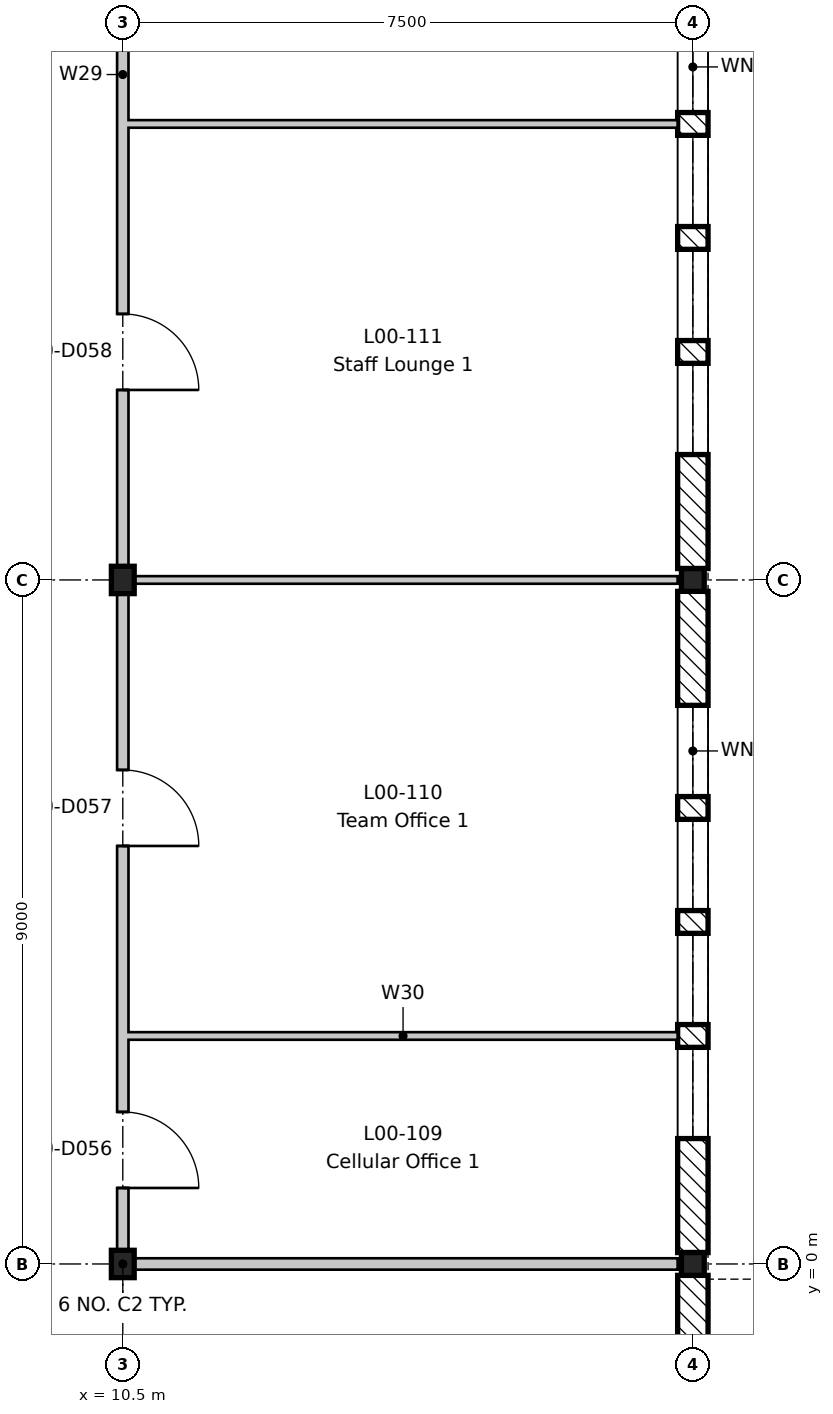
"""IFC4 building model, lengths in metres.
Left out: names, types, materials, properties, quantities, classifications, styles, units other than length and angle.
Written with IfcOpenShell. Run it as: python <this file> out.ifc"""

import sys

from ifc_helpers import new_model, si_unit, direction, frame, frame_2d, origin, origin_2d, place, context, subcontext, project, spatial, rectangle, i_section, extrude, element, fill, save


model = new_model("IFC4")
c1 = context("Model", 3, precision=1e-05, world=origin(), true_north=direction((0.0, 1.0)))
c2 = subcontext(c1, "Body", "Model", "MODEL_VIEW")
j1 = project(units=[si_unit("LENGTHUNIT", "METRE"), si_unit("PLANEANGLEUNIT", "RADIAN")], contexts=[c1])
p1 = place(None, origin())
s1 = spatial("IfcSite", under=j1, at=p1, CompositionType="ELEMENT")
p2 = place(p1, origin())
s2 = spatial("IfcBuilding", under=s1, at=p2, CompositionType="ELEMENT")
p3 = place(p2, origin())
s3 = spatial("IfcBuildingStorey", under=s2, at=p3, CompositionType="ELEMENT", Elevation=0.0)
for number, where, z_axis, x_axis in (
    (1, (10.5, 0.0, -0.6), (0.0, 0.0, 1.0), (1.0, 0.0, 0.0)),
    (2, (10.5, 9.0, -0.6), (0.0, 0.0, 1.0), (1.0, 0.0, 0.0)),
):
    element("IfcColumn", number, at=place(p3, frame(where, z_axis=z_axis, x_axis=x_axis)), inside=s3, PredefinedType="COLUMN", context=c2, shape_type="SweptSolid", body=[
        extrude(i_section(OverallWidth=0.3, OverallDepth=0.36, WebThickness=0.012, FlangeThickness=0.022, FilletRadius=0.027, at=origin_2d()), origin(), (0.0, 0.0, 1.0), 5.8),
    ])
for number, where, z_axis, x_axis in (
    (3, (18.0, 0.0, -0.6), (0.0, 0.0, 1.0), (1.0, 0.0, 0.0)),
    (4, (18.0, 9.0, -0.6), (0.0, 0.0, 1.0), (1.0, 0.0, 0.0)),
):
    element("IfcColumn", number, at=place(p3, frame(where, z_axis=z_axis, x_axis=x_axis)), inside=s3, PredefinedType="COLUMN", context=c2, shape_type="SweptSolid", body=[
        extrude(i_section(OverallWidth=0.3, OverallDepth=0.3, WebThickness=0.011, FlangeThickness=0.019, FilletRadius=0.027, at=origin_2d()), origin(), (0.0, 0.0, 1.0), 5.8),
    ])
p4 = place(p3, frame((18.0, -0.15, 0.0), z_axis=(0.0, 0.0, 1.0), x_axis=(0.0, -1.0, 0.0)))
e5 = element("IfcWall", 5, at=p4, inside=s3, PredefinedType="STANDARD", context=c2, shape_type="SweptSolid", body=[
    extrude(rectangle(XDim=8.7, YDim=0.4, at=frame_2d((4.35, 0.0))), origin(), (0.0, 0.0, 1.0), 4.8),
])
p5 = place(p4, frame((6.0, 0.0, 0.6)))
e6 = element("IfcOpeningElement", 6, at=p5, cuts=e5, PredefinedType="OPENING", context=c2, shape_type="SweptSolid", body=[
    extrude(rectangle(XDim=1.2, YDim=3.9, at=frame_2d((0.6, 1.95))), frame((0.0, 0.21, 0.0), z_axis=(0.0, -1.0, 0.0), x_axis=(1.0, 0.0, 0.0)), (0.0, 0.0, 1.0), 0.42),
])
p6 = place(p4, frame((4.5, 0.0, 0.6)))
e7 = element("IfcOpeningElement", 7, at=p6, cuts=e5, PredefinedType="OPENING", context=c2, shape_type="SweptSolid", body=[
    extrude(rectangle(XDim=1.2, YDim=3.9, at=frame_2d((0.6, 1.95))), frame((0.0, 0.21, 0.0), z_axis=(0.0, -1.0, 0.0), x_axis=(1.0, 0.0, 0.0)), (0.0, 0.0, 1.0), 0.42),
])
p7 = place(p4, frame((3.0, 0.0, 0.6)))
e8 = element("IfcOpeningElement", 8, at=p7, cuts=e5, PredefinedType="OPENING", context=c2, shape_type="SweptSolid", body=[
    extrude(rectangle(XDim=1.2, YDim=3.9, at=frame_2d((0.6, 1.95))), frame((0.0, 0.21, 0.0), z_axis=(0.0, -1.0, 0.0), x_axis=(1.0, 0.0, 0.0)), (0.0, 0.0, 1.0), 0.42),
])
p8 = place(p4, frame((1.5, 0.0, 0.6)))
e9 = element("IfcOpeningElement", 9, at=p8, cuts=e5, PredefinedType="OPENING", context=c2, shape_type="SweptSolid", body=[
    extrude(rectangle(XDim=1.2, YDim=3.9, at=frame_2d((0.6, 1.95))), frame((0.0, 0.21, 0.0), z_axis=(0.0, -1.0, 0.0), x_axis=(1.0, 0.0, 0.0)), (0.0, 0.0, 1.0), 0.42),
])
p9 = place(p3, frame((18.0, 8.85, 0.0), z_axis=(0.0, 0.0, 1.0), x_axis=(0.0, -1.0, 0.0)))
e10 = element("IfcWall", 10, at=p9, inside=s3, PredefinedType="STANDARD", context=c2, shape_type="SweptSolid", body=[
    extrude(rectangle(XDim=8.7, YDim=0.4, at=frame_2d((4.35, 0.0))), origin(), (0.0, 0.0, 1.0), 4.8),
])
p10 = place(p9, frame((6.0, 0.0, 0.6)))
e11 = element("IfcOpeningElement", 11, at=p10, cuts=e10, PredefinedType="OPENING", context=c2, shape_type="SweptSolid", body=[
    extrude(rectangle(XDim=1.2, YDim=3.9, at=frame_2d((0.6, 1.95))), frame((0.0, 0.21, 0.0), z_axis=(0.0, -1.0, 0.0), x_axis=(1.0, 0.0, 0.0)), (0.0, 0.0, 1.0), 0.42),
])
p11 = place(p9, frame((4.5, 0.0, 0.6)))
e12 = element("IfcOpeningElement", 12, at=p11, cuts=e10, PredefinedType="OPENING", context=c2, shape_type="SweptSolid", body=[
    extrude(rectangle(XDim=1.2, YDim=3.9, at=frame_2d((0.6, 1.95))), frame((0.0, 0.21, 0.0), z_axis=(0.0, -1.0, 0.0), x_axis=(1.0, 0.0, 0.0)), (0.0, 0.0, 1.0), 0.42),
])
p12 = place(p9, frame((3.0, 0.0, 0.6)))
e13 = element("IfcOpeningElement", 13, at=p12, cuts=e10, PredefinedType="OPENING", context=c2, shape_type="SweptSolid", body=[
    extrude(rectangle(XDim=1.2, YDim=3.9, at=frame_2d((0.6, 1.95))), frame((0.0, 0.21, 0.0), z_axis=(0.0, -1.0, 0.0), x_axis=(1.0, 0.0, 0.0)), (0.0, 0.0, 1.0), 0.42),
])
p13 = place(p9, frame((1.5, 0.0, 0.6)))
e14 = element("IfcOpeningElement", 14, at=p13, cuts=e10, PredefinedType="OPENING", context=c2, shape_type="SweptSolid", body=[
    extrude(rectangle(XDim=1.2, YDim=3.9, at=frame_2d((0.6, 1.95))), frame((0.0, 0.21, 0.0), z_axis=(0.0, -1.0, 0.0), x_axis=(1.0, 0.0, 0.0)), (0.0, 0.0, 1.0), 0.42),
])
p14 = place(p3, frame((18.0, 17.85, 0.0), z_axis=(0.0, 0.0, 1.0), x_axis=(0.0, -1.0, 0.0)))
e15 = element("IfcWall", 15, at=p14, inside=s3, PredefinedType="STANDARD", context=c2, shape_type="SweptSolid", body=[
    extrude(rectangle(XDim=8.7, YDim=0.4, at=frame_2d((4.35, 0.0))), origin(), (0.0, 0.0, 1.0), 4.8),
])
p15 = place(p14, frame((6.0, 0.0, 0.6)))
e16 = element("IfcOpeningElement", 16, at=p15, cuts=e15, PredefinedType="OPENING", context=c2, shape_type="SweptSolid", body=[
    extrude(rectangle(XDim=1.2, YDim=3.9, at=frame_2d((0.6, 1.95))), frame((0.0, 0.21, 0.0), z_axis=(0.0, -1.0, 0.0), x_axis=(1.0, 0.0, 0.0)), (0.0, 0.0, 1.0), 0.42),
])
p16 = place(p14, frame((4.5, 0.0, 0.6)))
e17 = element("IfcOpeningElement", 17, at=p16, cuts=e15, PredefinedType="OPENING", context=c2, shape_type="SweptSolid", body=[
    extrude(rectangle(XDim=1.2, YDim=3.9, at=frame_2d((0.6, 1.95))), frame((0.0, 0.21, 0.0), z_axis=(0.0, -1.0, 0.0), x_axis=(1.0, 0.0, 0.0)), (0.0, 0.0, 1.0), 0.42),
])
p17 = place(p14, frame((3.0, 0.0, 0.6)))
e18 = element("IfcOpeningElement", 18, at=p17, cuts=e15, PredefinedType="OPENING", context=c2, shape_type="SweptSolid", body=[
    extrude(rectangle(XDim=1.2, YDim=3.9, at=frame_2d((0.6, 1.95))), frame((0.0, 0.21, 0.0), z_axis=(0.0, -1.0, 0.0), x_axis=(1.0, 0.0, 0.0)), (0.0, 0.0, 1.0), 0.42),
])
p18 = place(p14, frame((1.5, 0.0, 0.6)))
e19 = element("IfcOpeningElement", 19, at=p18, cuts=e15, PredefinedType="OPENING", context=c2, shape_type="SweptSolid", body=[
    extrude(rectangle(XDim=1.2, YDim=3.9, at=frame_2d((0.6, 1.95))), frame((0.0, 0.21, 0.0), z_axis=(0.0, -1.0, 0.0), x_axis=(1.0, 0.0, 0.0)), (0.0, 0.0, 1.0), 0.42),
])
p19 = place(p3, frame((10.575, 0.0, 0.0), z_axis=(0.0, 0.0, 1.0), x_axis=(1.0, 0.0, 0.0)))
e20 = element("IfcWall", 20, at=p19, inside=s3, PredefinedType="PARTITIONING", context=c2, shape_type="SweptSolid", body=[
    extrude(rectangle(XDim=7.225, YDim=0.15, at=frame_2d((3.613, 0.0))), origin(), (0.0, 0.0, 1.0), 4.85),
])
p20 = place(p3, frame((10.575, 3.0, 0.0), z_axis=(0.0, 0.0, 1.0), x_axis=(1.0, 0.0, 0.0)))
e21 = element("IfcWall", 21, at=p20, inside=s3, PredefinedType="PARTITIONING", context=c2, shape_type="SweptSolid", body=[
    extrude(rectangle(XDim=7.225, YDim=0.1, at=frame_2d((3.613, 0.0))), origin(), (0.0, 0.0, 1.0), 5.2),
])
p21 = place(p3, frame((10.575, 9.0, 0.0), z_axis=(0.0, 0.0, 1.0), x_axis=(1.0, 0.0, 0.0)))
e22 = element("IfcWall", 22, at=p21, inside=s3, PredefinedType="PARTITIONING", context=c2, shape_type="SweptSolid", body=[
    extrude(rectangle(XDim=7.225, YDim=0.1, at=frame_2d((3.613, 0.0))), origin(), (0.0, 0.0, 1.0), 4.85),
])
p22 = place(p3, frame((10.575, 15.0, 0.0), z_axis=(0.0, 0.0, 1.0), x_axis=(1.0, 0.0, 0.0)))
e23 = element("IfcWall", 23, at=p22, inside=s3, PredefinedType="PARTITIONING", context=c2, shape_type="SweptSolid", body=[
    extrude(rectangle(XDim=7.225, YDim=0.1, at=frame_2d((3.613, 0.0))), origin(), (0.0, 0.0, 1.0), 5.2),
])
p23 = place(p3, frame((10.5, 0.0, 0.0), z_axis=(0.0, 0.0, 1.0), x_axis=(0.0, 1.0, 0.0)))
e24 = element("IfcWall", 24, at=p23, inside=s3, PredefinedType="PARTITIONING", context=c2, shape_type="SweptSolid", body=[
    extrude(rectangle(XDim=70.5, YDim=0.15, at=frame_2d((35.25, 0.0))), origin(), (0.0, 0.0, 1.0), 4.68),
])
p24 = place(p23, frame((1.0, 0.0, 0.0)))
e25 = element("IfcOpeningElement", 25, at=p24, cuts=e24, PredefinedType="OPENING", context=c2, shape_type="SweptSolid", body=[
    extrude(rectangle(XDim=1.0, YDim=2.1, at=frame_2d((0.5, 1.05))), frame((0.0, 0.085, 0.0), z_axis=(0.0, -1.0, 0.0), x_axis=(1.0, 0.0, 0.0)), (0.0, 0.0, 1.0), 0.17),
])
p25 = place(p23, frame((5.5, 0.0, 0.0)))
e26 = element("IfcOpeningElement", 26, at=p25, cuts=e24, PredefinedType="OPENING", context=c2, shape_type="SweptSolid", body=[
    extrude(rectangle(XDim=1.0, YDim=2.1, at=frame_2d((0.5, 1.05))), frame((0.0, 0.085, 0.0), z_axis=(0.0, -1.0, 0.0), x_axis=(1.0, 0.0, 0.0)), (0.0, 0.0, 1.0), 0.17),
])
p26 = place(p23, frame((11.5, 0.0, 0.0)))
e27 = element("IfcOpeningElement", 27, at=p26, cuts=e24, PredefinedType="OPENING", context=c2, shape_type="SweptSolid", body=[
    extrude(rectangle(XDim=1.0, YDim=2.1, at=frame_2d((0.5, 1.05))), frame((0.0, 0.085, 0.0), z_axis=(0.0, -1.0, 0.0), x_axis=(1.0, 0.0, 0.0)), (0.0, 0.0, 1.0), 0.17),
])
p27 = place(p23, frame((18.8, 0.0, 0.0)))
e28 = element("IfcOpeningElement", 28, at=p27, cuts=e24, PredefinedType="OPENING", context=c2, shape_type="SweptSolid", body=[
    extrude(rectangle(XDim=1.4, YDim=2.1, at=frame_2d((0.7, 1.05))), frame((0.0, 0.085, 0.0), z_axis=(0.0, -1.0, 0.0), x_axis=(1.0, 0.0, 0.0)), (0.0, 0.0, 1.0), 0.17),
])
p28 = place(p23, frame((25.0, 0.0, 0.0)))
e29 = element("IfcOpeningElement", 29, at=p28, cuts=e24, PredefinedType="OPENING", context=c2, shape_type="SweptSolid", body=[
    extrude(rectangle(XDim=1.0, YDim=2.1, at=frame_2d((0.5, 1.05))), frame((0.0, 0.085, 0.0), z_axis=(0.0, -1.0, 0.0), x_axis=(1.0, 0.0, 0.0)), (0.0, 0.0, 1.0), 0.17),
])
p29 = place(p23, frame((28.0, 0.0, 0.0)))
e30 = element("IfcOpeningElement", 30, at=p29, cuts=e24, PredefinedType="OPENING", context=c2, shape_type="SweptSolid", body=[
    extrude(rectangle(XDim=1.0, YDim=2.1, at=frame_2d((0.5, 1.05))), frame((0.0, 0.085, 0.0), z_axis=(0.0, -1.0, 0.0), x_axis=(1.0, 0.0, 0.0)), (0.0, 0.0, 1.0), 0.17),
])
p30 = place(p23, frame((33.8, 0.0, 0.0)))
e31 = element("IfcOpeningElement", 31, at=p30, cuts=e24, PredefinedType="OPENING", context=c2, shape_type="SweptSolid", body=[
    extrude(rectangle(XDim=1.4, YDim=2.1, at=frame_2d((0.7, 1.05))), frame((0.0, 0.085, 0.0), z_axis=(0.0, -1.0, 0.0), x_axis=(1.0, 0.0, 0.0)), (0.0, 0.0, 1.0), 0.17),
])
p31 = place(p23, frame((41.5, 0.0, 0.0)))
e32 = element("IfcOpeningElement", 32, at=p31, cuts=e24, PredefinedType="OPENING", context=c2, shape_type="SweptSolid", body=[
    extrude(rectangle(XDim=1.0, YDim=2.1, at=frame_2d((0.5, 1.05))), frame((0.0, 0.085, 0.0), z_axis=(0.0, -1.0, 0.0), x_axis=(1.0, 0.0, 0.0)), (0.0, 0.0, 1.0), 0.17),
])
p32 = place(p23, frame((46.0, 0.0, 0.0)))
e33 = element("IfcOpeningElement", 33, at=p32, cuts=e24, PredefinedType="OPENING", context=c2, shape_type="SweptSolid", body=[
    extrude(rectangle(XDim=1.0, YDim=2.1, at=frame_2d((0.5, 1.05))), frame((0.0, 0.085, 0.0), z_axis=(0.0, -1.0, 0.0), x_axis=(1.0, 0.0, 0.0)), (0.0, 0.0, 1.0), 0.17),
])
p33 = place(p23, frame((49.0, 0.0, 0.0)))
e34 = element("IfcOpeningElement", 34, at=p33, cuts=e24, PredefinedType="OPENING", context=c2, shape_type="SweptSolid", body=[
    extrude(rectangle(XDim=1.0, YDim=2.1, at=frame_2d((0.5, 1.05))), frame((0.0, 0.085, 0.0), z_axis=(0.0, -1.0, 0.0), x_axis=(1.0, 0.0, 0.0)), (0.0, 0.0, 1.0), 0.17),
])
p34 = place(p23, frame((54.75, 0.0, 0.0)))
e35 = element("IfcOpeningElement", 35, at=p34, cuts=e24, PredefinedType="OPENING", context=c2, shape_type="SweptSolid", body=[
    extrude(rectangle(XDim=1.0, YDim=2.1, at=frame_2d((0.5, 1.05))), frame((0.0, 0.085, 0.0), z_axis=(0.0, -1.0, 0.0), x_axis=(1.0, 0.0, 0.0)), (0.0, 0.0, 1.0), 0.17),
])
p35 = place(p23, frame((58.0, 0.0, 0.0)))
e36 = element("IfcOpeningElement", 36, at=p35, cuts=e24, PredefinedType="OPENING", context=c2, shape_type="SweptSolid", body=[
    extrude(rectangle(XDim=1.0, YDim=2.1, at=frame_2d((0.5, 1.05))), frame((0.0, 0.085, 0.0), z_axis=(0.0, -1.0, 0.0), x_axis=(1.0, 0.0, 0.0)), (0.0, 0.0, 1.0), 0.17),
])
p36 = place(p23, frame((61.0, 0.0, 0.0)))
e37 = element("IfcOpeningElement", 37, at=p36, cuts=e24, PredefinedType="OPENING", context=c2, shape_type="SweptSolid", body=[
    extrude(rectangle(XDim=1.0, YDim=2.1, at=frame_2d((0.5, 1.05))), frame((0.0, 0.085, 0.0), z_axis=(0.0, -1.0, 0.0), x_axis=(1.0, 0.0, 0.0)), (0.0, 0.0, 1.0), 0.17),
])
p37 = place(p23, frame((64.0, 0.0, 0.0)))
e38 = element("IfcOpeningElement", 38, at=p37, cuts=e24, PredefinedType="OPENING", context=c2, shape_type="SweptSolid", body=[
    extrude(rectangle(XDim=1.0, YDim=2.1, at=frame_2d((0.5, 1.05))), frame((0.0, 0.085, 0.0), z_axis=(0.0, -1.0, 0.0), x_axis=(1.0, 0.0, 0.0)), (0.0, 0.0, 1.0), 0.17),
])
p38 = place(p10, origin())
e39 = element("IfcWindow", 39, at=p38, inside=s3, PartitioningType="SINGLE_PANEL", PredefinedType="WINDOW", context=c2, shape_type="SweptSolid", body=[
    extrude(rectangle(XDim=1.2, YDim=3.9, at=frame_2d((0.6, 1.95))), frame((0.0, 0.03, 0.0), z_axis=(0.0, -1.0, 0.0), x_axis=(1.0, 0.0, 0.0)), (0.0, 0.0, 1.0), 0.06),
])
fill(e11, e39)
p39 = place(p11, origin())
e40 = element("IfcWindow", 40, at=p39, inside=s3, PartitioningType="SINGLE_PANEL", PredefinedType="WINDOW", context=c2, shape_type="SweptSolid", body=[
    extrude(rectangle(XDim=1.2, YDim=3.9, at=frame_2d((0.6, 1.95))), frame((0.0, 0.03, 0.0), z_axis=(0.0, -1.0, 0.0), x_axis=(1.0, 0.0, 0.0)), (0.0, 0.0, 1.0), 0.06),
])
fill(e12, e40)
p40 = place(p12, origin())
e41 = element("IfcWindow", 41, at=p40, inside=s3, PartitioningType="SINGLE_PANEL", PredefinedType="WINDOW", context=c2, shape_type="SweptSolid", body=[
    extrude(rectangle(XDim=1.2, YDim=3.9, at=frame_2d((0.6, 1.95))), frame((0.0, 0.03, 0.0), z_axis=(0.0, -1.0, 0.0), x_axis=(1.0, 0.0, 0.0)), (0.0, 0.0, 1.0), 0.06),
])
fill(e13, e41)
p41 = place(p13, origin())
e42 = element("IfcWindow", 42, at=p41, inside=s3, PartitioningType="SINGLE_PANEL", PredefinedType="WINDOW", context=c2, shape_type="SweptSolid", body=[
    extrude(rectangle(XDim=1.2, YDim=3.9, at=frame_2d((0.6, 1.95))), frame((0.0, 0.03, 0.0), z_axis=(0.0, -1.0, 0.0), x_axis=(1.0, 0.0, 0.0)), (0.0, 0.0, 1.0), 0.06),
])
fill(e14, e42)
p42 = place(p15, origin())
e43 = element("IfcWindow", 43, at=p42, inside=s3, PartitioningType="SINGLE_PANEL", PredefinedType="WINDOW", context=c2, shape_type="SweptSolid", body=[
    extrude(rectangle(XDim=1.2, YDim=3.9, at=frame_2d((0.6, 1.95))), frame((0.0, 0.03, 0.0), z_axis=(0.0, -1.0, 0.0), x_axis=(1.0, 0.0, 0.0)), (0.0, 0.0, 1.0), 0.06),
])
fill(e16, e43)
p43 = place(p16, origin())
e44 = element("IfcWindow", 44, at=p43, inside=s3, PartitioningType="SINGLE_PANEL", PredefinedType="WINDOW", context=c2, shape_type="SweptSolid", body=[
    extrude(rectangle(XDim=1.2, YDim=3.9, at=frame_2d((0.6, 1.95))), frame((0.0, 0.03, 0.0), z_axis=(0.0, -1.0, 0.0), x_axis=(1.0, 0.0, 0.0)), (0.0, 0.0, 1.0), 0.06),
])
fill(e17, e44)
p44 = place(p17, origin())
e45 = element("IfcWindow", 45, at=p44, inside=s3, PartitioningType="SINGLE_PANEL", PredefinedType="WINDOW", context=c2, shape_type="SweptSolid", body=[
    extrude(rectangle(XDim=1.2, YDim=3.9, at=frame_2d((0.6, 1.95))), frame((0.0, 0.03, 0.0), z_axis=(0.0, -1.0, 0.0), x_axis=(1.0, 0.0, 0.0)), (0.0, 0.0, 1.0), 0.06),
])
fill(e18, e45)
p45 = place(p18, origin())
e46 = element("IfcWindow", 46, at=p45, inside=s3, PartitioningType="SINGLE_PANEL", PredefinedType="WINDOW", context=c2, shape_type="SweptSolid", body=[
    extrude(rectangle(XDim=1.2, YDim=3.9, at=frame_2d((0.6, 1.95))), frame((0.0, 0.03, 0.0), z_axis=(0.0, -1.0, 0.0), x_axis=(1.0, 0.0, 0.0)), (0.0, 0.0, 1.0), 0.06),
])
fill(e19, e46)
p46 = place(p24, frame((1.0, 0.0, 0.0), z_axis=(0.0, 0.0, 1.0), x_axis=(-1.0, 0.0, 0.0)))
e47 = element("IfcDoor", 47, at=p46, inside=s3, OperationType="SINGLE_SWING_RIGHT", PredefinedType="DOOR", context=c2, shape_type="SweptSolid", body=[
    extrude(rectangle(XDim=1.0, YDim=2.1, at=frame_2d((0.5, 1.05))), frame((0.0, 0.025, 0.0), z_axis=(0.0, -1.0, 0.0), x_axis=(1.0, 0.0, 0.0)), (0.0, 0.0, 1.0), 0.05),
])
fill(e25, e47)
p47 = place(p25, frame((1.0, 0.0, 0.0), z_axis=(0.0, 0.0, 1.0), x_axis=(-1.0, 0.0, 0.0)))
e48 = element("IfcDoor", 48, at=p47, inside=s3, OperationType="SINGLE_SWING_RIGHT", PredefinedType="DOOR", context=c2, shape_type="SweptSolid", body=[
    extrude(rectangle(XDim=1.0, YDim=2.1, at=frame_2d((0.5, 1.05))), frame((0.0, 0.025, 0.0), z_axis=(0.0, -1.0, 0.0), x_axis=(1.0, 0.0, 0.0)), (0.0, 0.0, 1.0), 0.05),
])
fill(e26, e48)
p48 = place(p26, frame((1.0, 0.0, 0.0), z_axis=(0.0, 0.0, 1.0), x_axis=(-1.0, 0.0, 0.0)))
e49 = element("IfcDoor", 49, at=p48, inside=s3, OperationType="SINGLE_SWING_RIGHT", PredefinedType="DOOR", context=c2, shape_type="SweptSolid", body=[
    extrude(rectangle(XDim=1.0, YDim=2.1, at=frame_2d((0.5, 1.05))), frame((0.0, 0.025, 0.0), z_axis=(0.0, -1.0, 0.0), x_axis=(1.0, 0.0, 0.0)), (0.0, 0.0, 1.0), 0.05),
])
fill(e27, e49)
save(model, sys.argv[1])
